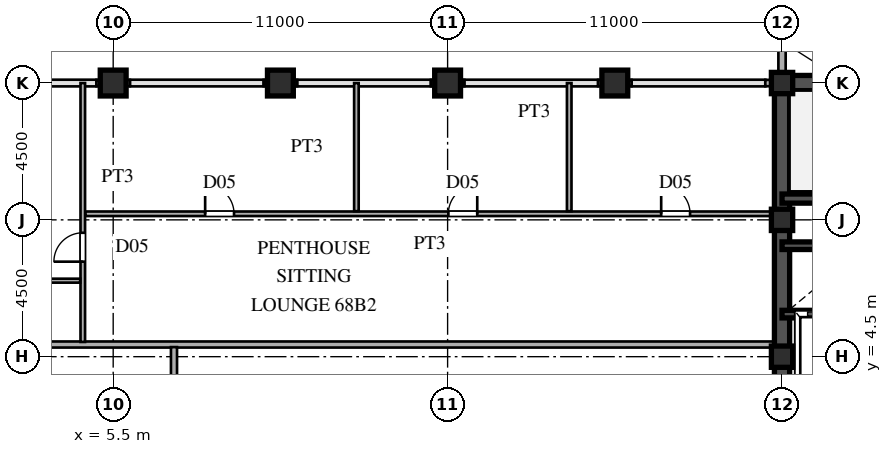
"""IFC4 building model, lengths in metres.
Left out: names, types, materials, properties, quantities, classifications, styles, units other than length and angle.
Written with IfcOpenShell. Run it as: python <this file> out.ifc"""

import sys

from ifc_helpers import new_model, si_unit, direction, frame, frame_2d, origin, origin_2d, place, context, subcontext, project, spatial, rectangle, hollow_rectangle, extrude, source, transform, mapped, element, fill, save


model = new_model("IFC4")
c1 = context("Model", 3, precision=1e-05, world=origin(), true_north=direction((0.0, 1.0)))
c2 = subcontext(c1, "Body", "Model", "MODEL_VIEW")
j1 = project(units=[si_unit("LENGTHUNIT", "METRE"), si_unit("PLANEANGLEUNIT", "RADIAN")], contexts=[c1])
p1 = place(None, origin())
s1 = spatial("IfcSite", under=j1, at=p1, CompositionType="ELEMENT")
p2 = place(p1, origin())
s2 = spatial("IfcBuilding", under=s1, at=p2, CompositionType="ELEMENT")
p3 = place(p2, frame((0.0, 0.0, 258.15)))
s3 = spatial("IfcBuildingStorey", under=s2, at=p3, CompositionType="ELEMENT", Elevation=258.15)
m1 = source(origin(), c2, "Body", "SweptSolid", [
    extrude(hollow_rectangle(XDim=0.7, YDim=0.7, WallThickness=0.03, at=origin_2d()), origin(), (0.0, 0.0, 1.0), 3.75),
])
for number, where, z_axis, x_axis in (
    (1, (27.5, 4.5, 0.0), (0.0, 0.0, 1.0), (1.0, 0.0, 0.0)),
    (2, (27.5, 9.0, 0.0), (0.0, 0.0, 1.0), (1.0, 0.0, 0.0)),
    (3, (27.5, 13.5, 0.0), (0.0, 0.0, 1.0), (1.0, 0.0, 0.0)),
):
    element("IfcColumn", number, at=place(p3, frame(where, z_axis=z_axis, x_axis=x_axis)), inside=s3, PredefinedType="COLUMN", context=c2, shape_type="MappedRepresentation", body=[
        mapped(m1, transform((0.0, 0.0, 0.0), scale=1.0)),
    ])
m2 = source(origin(), c2, "Body", "SweptSolid", [
    extrude(hollow_rectangle(XDim=0.85, YDim=0.85, WallThickness=0.036, at=origin_2d()), origin(), (0.0, 0.0, 1.0), 3.75),
])
for number, where, z_axis, x_axis in (
    (4, (5.5, 13.5, 0.0), (0.0, 0.0, 1.0), (1.0, 0.0, 0.0)),
    (5, (11.0, 13.5, 0.0), (0.0, 0.0, 1.0), (1.0, 0.0, 0.0)),
    (6, (16.5, 13.5, 0.0), (0.0, 0.0, 1.0), (1.0, 0.0, 0.0)),
    (7, (22.0, 13.5, 0.0), (0.0, 0.0, 1.0), (1.0, 0.0, 0.0)),
):
    element("IfcColumn", number, at=place(p3, frame(where, z_axis=z_axis, x_axis=x_axis)), inside=s3, PredefinedType="COLUMN", context=c2, shape_type="MappedRepresentation", body=[
        mapped(m2, transform((0.0, 0.0, 0.0), scale=1.0)),
    ])
p4 = place(p3, frame((27.5, 13.755, 0.0), z_axis=(0.0, 0.0, 1.0), x_axis=(0.0, 1.0, 0.0)))
e8 = element("IfcWall", 8, at=p4, inside=s3, PredefinedType="SOLIDWALL", context=c2, shape_type="SweptSolid", body=[
    extrude(rectangle(XDim=0.62, YDim=0.24, at=frame_2d((0.31, 0.0))), origin(), (0.0, 0.0, 1.0), 3.03),
])
p5 = place(p3, frame((27.5, 14.375, 0.0), z_axis=(0.0, 0.0, 1.0), x_axis=(0.0, 1.0, 0.0)))
e9 = element("IfcWall", 9, at=p5, inside=s3, PredefinedType="SOLIDWALL", context=c2, shape_type="SweptSolid", body=[
    extrude(rectangle(XDim=1.605, YDim=0.24, at=frame_2d((0.803, 0.0))), origin(), (0.0, 0.0, 1.0), 3.53),
])
for number, where, z_axis, x_axis in (
    (10, (4.95, 13.5, 0.0), (0.0, 0.0, 1.0), (1.0, 0.0, 0.0)),
    (11, (10.45, 13.5, 0.0), (0.0, 0.0, 1.0), (1.0, 0.0, 0.0)),
    (12, (15.95, 13.5, 0.0), (0.0, 0.0, 1.0), (1.0, 0.0, 0.0)),
    (13, (21.45, 13.5, 0.0), (0.0, 0.0, 1.0), (1.0, 0.0, 0.0)),
):
    element("IfcWall", number, at=place(p3, frame(where, z_axis=z_axis, x_axis=x_axis)), inside=s3, PredefinedType="SOLIDWALL", context=c2, shape_type="SweptSolid", body=[
        extrude(rectangle(XDim=1.1, YDim=0.21, at=frame_2d((0.55, 0.0))), origin(), (0.0, 0.0, 1.0), 3.03),
    ])
p6 = place(p3, frame((26.95, 13.5, 0.0), z_axis=(0.0, 0.0, 1.0), x_axis=(1.0, 0.0, 0.0)))
e14 = element("IfcWall", 14, at=p6, inside=s3, PredefinedType="SOLIDWALL", context=c2, shape_type="SweptSolid", body=[
    extrude(rectangle(XDim=0.54, YDim=0.21, at=frame_2d((0.27, 0.0))), origin(), (0.0, 0.0, 1.0), 3.03),
])
p7 = place(p3, frame((27.5, 1.3, 0.0), z_axis=(0.0, 0.0, 1.0), x_axis=(0.0, 1.0, 0.0)))
e15 = element("IfcWall", 15, at=p7, inside=s3, PredefinedType="SHEAR", context=c2, shape_type="SweptSolid", body=[
    extrude(rectangle(XDim=12.2, YDim=0.5, at=frame_2d((6.1, 0.0))), origin(), (0.0, 0.0, 1.0), 3.53),
])
p8 = place(p3, frame((27.5, 13.5, 0.0), z_axis=(0.0, 0.0, 1.0), x_axis=(1.0, 0.0, 0.0)))
e16 = element("IfcWall", 16, at=p8, inside=s3, PredefinedType="SHEAR", context=c2, shape_type="SweptSolid", body=[
    extrude(rectangle(XDim=9.0, YDim=0.5, at=frame_2d((4.5, 0.0))), origin(), (0.0, 0.0, 1.0), 3.53),
])
p9 = place(p3, frame((27.5, 9.7, 0.0), z_axis=(0.0, 0.0, 1.0), x_axis=(1.0, 0.0, 0.0)))
e17 = element("IfcWall", 17, at=p9, inside=s3, PredefinedType="SHEAR", context=c2, shape_type="SweptSolid", body=[
    extrude(rectangle(XDim=9.0, YDim=0.3, at=frame_2d((4.5, 0.0))), origin(), (0.0, 0.0, 1.0), 3.53),
])
p10 = place(p9, frame((7.3, 0.0, 0.0)))
e18 = element("IfcOpeningElement", 18, at=p10, cuts=e17, PredefinedType="OPENING", context=c2, shape_type="SweptSolid", body=[
    extrude(rectangle(XDim=1.1, YDim=2.2, at=frame_2d((0.55, 1.1))), frame((0.0, 0.16, 0.0), z_axis=(0.0, -1.0, 0.0), x_axis=(1.0, 0.0, 0.0)), (0.0, 0.0, 1.0), 0.32),
])
for number, where, z_axis, x_axis in (
    (19, (27.5, 5.9, 0.0), (0.0, 0.0, 1.0), (1.0, 0.0, 0.0)),
    (20, (27.5, 8.15, 0.0), (0.0, 0.0, 1.0), (1.0, 0.0, 0.0)),
):
    element("IfcWall", number, at=place(p3, frame(where, z_axis=z_axis, x_axis=x_axis)), inside=s3, PredefinedType="SHEAR", context=c2, shape_type="SweptSolid", body=[
        extrude(rectangle(XDim=2.8, YDim=0.25, at=frame_2d((1.4, 0.0))), origin(), (0.0, 0.0, 1.0), 3.53),
    ])
p11 = place(p3, frame((-27.245, 4.9, 0.0), z_axis=(0.0, 0.0, 1.0), x_axis=(1.0, 0.0, 0.0)))
e21 = element("IfcWall", 21, at=p11, inside=s3, PredefinedType="PARTITIONING", context=c2, shape_type="SweptSolid", body=[
    extrude(rectangle(XDim=54.49, YDim=0.2, at=frame_2d((27.245, 0.0))), origin(), (0.0, 0.0, 1.0), 3.53),
])
p12 = place(p11, frame((22.47, 0.0, 0.0)))
e22 = element("IfcOpeningElement", 22, at=p12, cuts=e21, PredefinedType="OPENING", context=c2, shape_type="SweptSolid", body=[
    extrude(rectangle(XDim=1.05, YDim=2.25, at=frame_2d((0.525, 1.125))), frame((0.0, 0.11, 0.0), z_axis=(0.0, -1.0, 0.0), x_axis=(1.0, 0.0, 0.0)), (0.0, 0.0, 1.0), 0.22),
])
p13 = place(p3, frame((-0.915, 7.0, 0.0), z_axis=(0.0, 0.0, 1.0), x_axis=(1.0, 0.0, 0.0)))
e23 = element("IfcWall", 23, at=p13, inside=s3, PredefinedType="PARTITIONING", context=c2, shape_type="SweptSolid", body=[
    extrude(rectangle(XDim=5.33, YDim=0.13, at=frame_2d((2.665, 0.0))), origin(), (0.0, 0.0, 1.0), 3.53),
])
p14 = place(p3, frame((4.585, 9.2, 0.0), z_axis=(0.0, 0.0, 1.0), x_axis=(1.0, 0.0, 0.0)))
e24 = element("IfcWall", 24, at=p14, inside=s3, PredefinedType="PARTITIONING", context=c2, shape_type="SweptSolid", body=[
    extrude(rectangle(XDim=22.66, YDim=0.15, at=frame_2d((11.33, 0.0))), origin(), (0.0, 0.0, 1.0), 3.53),
])
p15 = place(p14, frame((3.94, 0.0, 0.0)))
e25 = element("IfcOpeningElement", 25, at=p15, cuts=e24, PredefinedType="OPENING", context=c2, shape_type="SweptSolid", body=[
    extrude(rectangle(XDim=0.95, YDim=2.15, at=frame_2d((0.475, 1.075))), frame((0.0, 0.085, 0.0), z_axis=(0.0, -1.0, 0.0), x_axis=(1.0, 0.0, 0.0)), (0.0, 0.0, 1.0), 0.17),
])
p16 = place(p14, frame((11.94, 0.0, 0.0)))
e26 = element("IfcOpeningElement", 26, at=p16, cuts=e24, PredefinedType="OPENING", context=c2, shape_type="SweptSolid", body=[
    extrude(rectangle(XDim=0.95, YDim=2.15, at=frame_2d((0.475, 1.075))), frame((0.0, 0.085, 0.0), z_axis=(0.0, -1.0, 0.0), x_axis=(1.0, 0.0, 0.0)), (0.0, 0.0, 1.0), 0.17),
])
p17 = place(p14, frame((18.94, 0.0, 0.0)))
e27 = element("IfcOpeningElement", 27, at=p17, cuts=e24, PredefinedType="OPENING", context=c2, shape_type="SweptSolid", body=[
    extrude(rectangle(XDim=0.95, YDim=2.15, at=frame_2d((0.475, 1.075))), frame((0.0, 0.085, 0.0), z_axis=(0.0, -1.0, 0.0), x_axis=(1.0, 0.0, 0.0)), (0.0, 0.0, 1.0), 0.17),
])
p18 = place(p3, frame((4.5, 4.985, 0.0), z_axis=(0.0, 0.0, 1.0), x_axis=(0.0, 1.0, 0.0)))
e28 = element("IfcWall", 28, at=p18, inside=s3, PredefinedType="PARTITIONING", context=c2, shape_type="SweptSolid", body=[
    extrude(rectangle(XDim=8.515, YDim=0.15, at=frame_2d((4.257, 0.0))), origin(), (0.0, 0.0, 1.0), 3.53),
])
p19 = place(p18, frame((2.64, 0.0, 0.0)))
e29 = element("IfcOpeningElement", 29, at=p19, cuts=e28, PredefinedType="OPENING", context=c2, shape_type="SweptSolid", body=[
    extrude(rectangle(XDim=0.95, YDim=2.15, at=frame_2d((0.475, 1.075))), frame((0.0, 0.085, 0.0), z_axis=(0.0, -1.0, 0.0), x_axis=(1.0, 0.0, 0.0)), (0.0, 0.0, 1.0), 0.17),
])
p20 = place(p3, frame((7.5, 1.435, 0.0), z_axis=(0.0, 0.0, 1.0), x_axis=(0.0, 1.0, 0.0)))
e30 = element("IfcWall", 30, at=p20, inside=s3, PredefinedType="PARTITIONING", context=c2, shape_type="SweptSolid", body=[
    extrude(rectangle(XDim=3.38, YDim=0.2, at=frame_2d((1.69, 0.0))), origin(), (0.0, 0.0, 1.0), 3.53),
])
for number, where, z_axis, x_axis in (
    (31, (13.5, 9.285, 0.0), (0.0, 0.0, 1.0), (0.0, 1.0, 0.0)),
    (32, (20.5, 9.285, 0.0), (0.0, 0.0, 1.0), (0.0, 1.0, 0.0)),
):
    element("IfcWall", number, at=place(p3, frame(where, z_axis=z_axis, x_axis=x_axis)), inside=s3, PredefinedType="PARTITIONING", context=c2, shape_type="SweptSolid", body=[
        extrude(rectangle(XDim=4.215, YDim=0.15, at=frame_2d((2.107, 0.0))), origin(), (0.0, 0.0, 1.0), 3.53),
    ])
m3 = source(origin(), c2, "Body", "SweptSolid", [
    extrude(rectangle(XDim=0.95, YDim=2.15, at=frame_2d((0.475, 1.075))), frame((0.0, 0.025, 0.0), z_axis=(0.0, -1.0, 0.0), x_axis=(1.0, 0.0, 0.0)), (0.0, 0.0, 1.0), 0.05),
])
p21 = place(p15, origin())
e33 = element("IfcDoor", 33, at=p21, inside=s3, OperationType="SINGLE_SWING_LEFT", PredefinedType="DOOR", context=c2, shape_type="MappedRepresentation", body=[
    mapped(m3, transform((0.0, 0.0, 0.0), scale=1.0)),
])
fill(e25, e33)
p22 = place(p16, origin())
e34 = element("IfcDoor", 34, at=p22, inside=s3, OperationType="SINGLE_SWING_RIGHT", PredefinedType="DOOR", context=c2, shape_type="MappedRepresentation", body=[
    mapped(m3, transform((0.0, 0.0, 0.0), scale=1.0)),
])
fill(e26, e34)
p23 = place(p17, origin())
e35 = element("IfcDoor", 35, at=p23, inside=s3, OperationType="SINGLE_SWING_LEFT", PredefinedType="DOOR", context=c2, shape_type="MappedRepresentation", body=[
    mapped(m3, transform((0.0, 0.0, 0.0), scale=1.0)),
])
fill(e27, e35)
p24 = place(p19, origin())
e36 = element("IfcDoor", 36, at=p24, inside=s3, OperationType="SINGLE_SWING_LEFT", PredefinedType="DOOR", context=c2, shape_type="MappedRepresentation", body=[
    mapped(m3, transform((0.0, 0.0, 0.0), scale=1.0)),
])
fill(e29, e36)
save(model, sys.argv[1])
